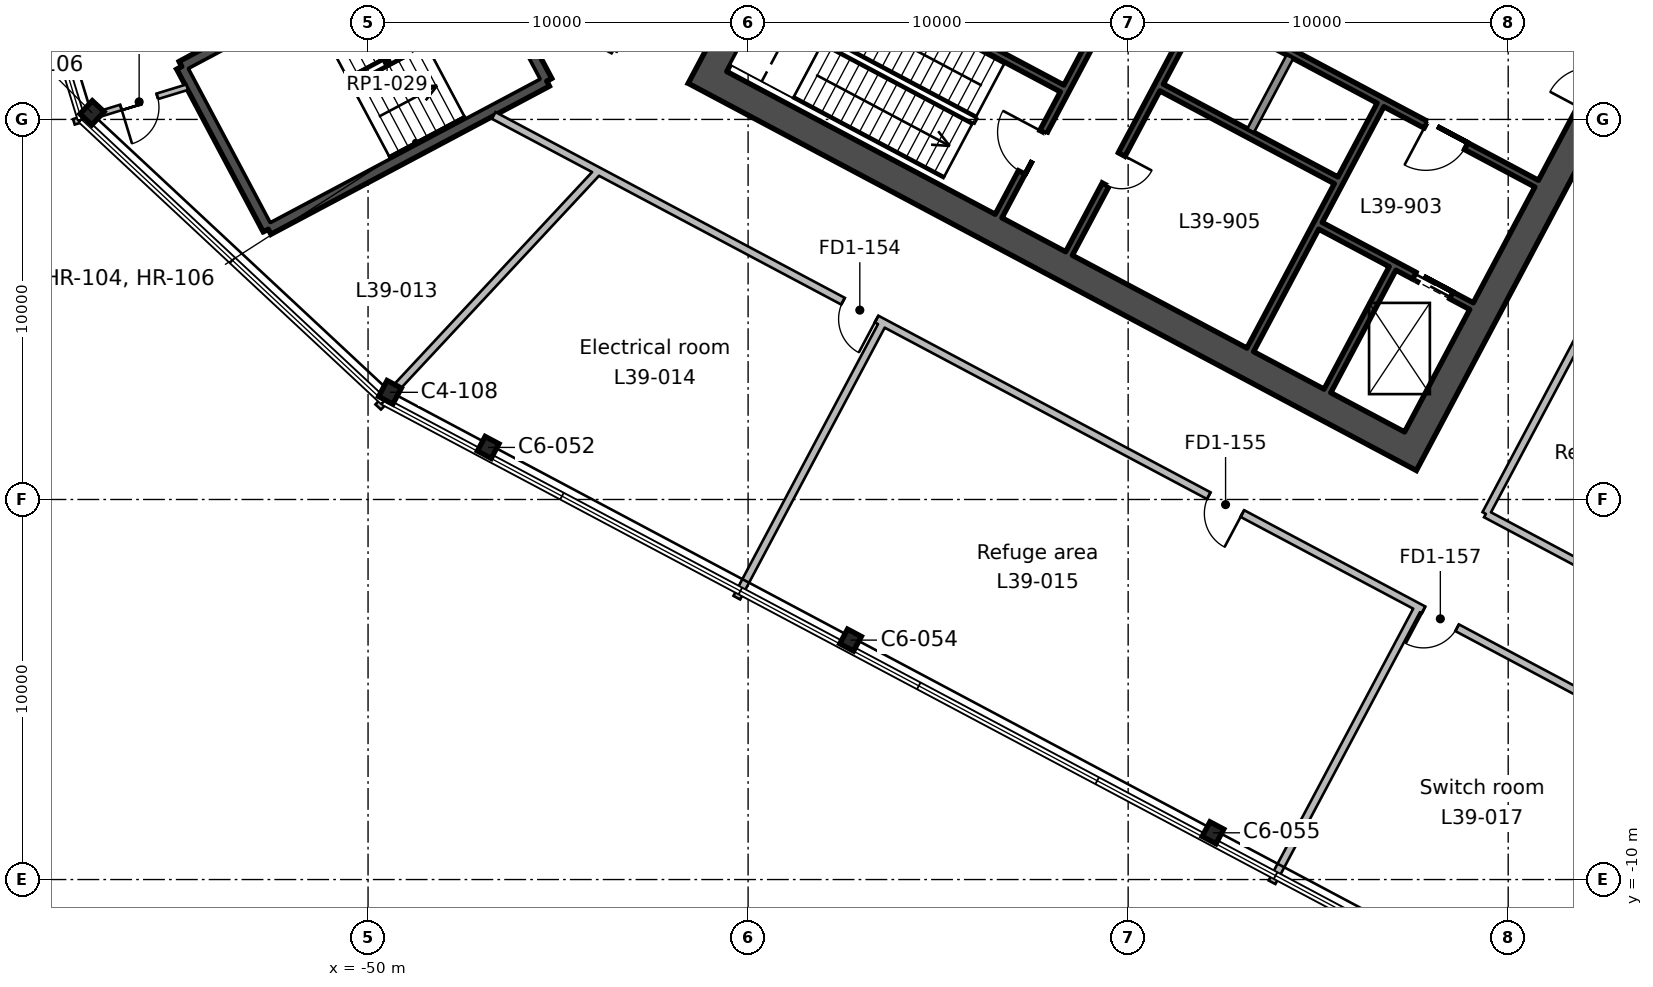
"""IFC4 building model, lengths in metres.
Left out: names, types, materials, properties, quantities, classifications, styles, units other than length and angle.
Written with IfcOpenShell. Run it as: python <this file> out.ifc"""

import sys

from ifc_helpers import new_model, si_unit, direction, frame, frame_2d, origin, origin_2d, place, context, subcontext, project, spatial, rectangle, i_section, extrude, element, fill, save


model = new_model("IFC4")
c1 = context("Model", 3, precision=1e-05, world=origin(), true_north=direction((0.0, 1.0)))
c2 = subcontext(c1, "Body", "Model", "MODEL_VIEW")
j1 = project(units=[si_unit("LENGTHUNIT", "METRE"), si_unit("PLANEANGLEUNIT", "RADIAN")], contexts=[c1])
p1 = place(None, origin())
s1 = spatial("IfcSite", under=j1, at=p1, CompositionType="ELEMENT")
p2 = place(p1, origin())
s2 = spatial("IfcBuilding", under=s1, at=p2, CompositionType="ELEMENT")
p3 = place(p2, frame((0.0, 0.0, 183.6)))
s3 = spatial("IfcBuildingStorey", under=s2, at=p3, CompositionType="ELEMENT", Elevation=183.6)
for number, where, z_axis, x_axis in (
    (1, (-27.768, -8.77, 0.0), (0.0, 0.0, 1.0), (0.883, -0.469, 0.0)),
    (2, (-37.304, -3.7, 0.0), (0.0, 0.0, 1.0), (0.883, -0.469, 0.0)),
    (3, (-46.839, 1.37, 0.0), (0.0, 0.0, 1.0), (0.883, -0.469, 0.0)),
):
    element("IfcColumn", number, at=place(p3, frame(where, z_axis=z_axis, x_axis=x_axis)), inside=s3, PredefinedType="COLUMN", context=c2, shape_type="SweptSolid", body=[
        extrude(i_section(OverallWidth=0.412, OverallDepth=0.434, WebThickness=0.036, FlangeThickness=0.057, FilletRadius=0.015, at=origin_2d()), origin(), (0.0, 0.0, 1.0), 6.0),
    ])
for number, where, z_axis, x_axis in (
    (4, (-49.423, 2.82, 0.0), (0.0, 0.0, 1.0), (0.883, -0.469, 0.0)),
    (5, (-57.262, 10.173, 0.0), (0.0, 0.0, 1.0), (0.731, -0.682, 0.0)),
):
    element("IfcColumn", number, at=place(p3, frame(where, z_axis=z_axis, x_axis=x_axis)), inside=s3, PredefinedType="COLUMN", context=c2, shape_type="SweptSolid", body=[
        extrude(i_section(OverallWidth=0.424, OverallDepth=0.475, WebThickness=0.048, FlangeThickness=0.077, FilletRadius=0.015, at=origin_2d()), origin(), (0.0, 0.0, 1.0), 6.0),
    ])
p4 = place(p3, frame((-13.498, 18.333, 0.0), z_axis=(0.0, 0.0, 1.0), x_axis=(-0.469469918705, -0.88294846703, 0.0)))
e6 = element("IfcWall", 6, at=p4, inside=s3, PredefinedType="SHEAR", context=c2, shape_type="SweptSolid", body=[
    extrude(rectangle(XDim=19.7, YDim=0.75, at=frame_2d((9.85, 0.0))), origin(), (0.0, 0.0, 1.0), 6.0),
])
p5 = place(p4, frame((6.85, 0.0, 0.0)))
e7 = element("IfcOpeningElement", 7, at=p5, cuts=e6, PredefinedType="OPENING", context=c2, shape_type="SweptSolid", body=[
    extrude(rectangle(XDim=2.4, YDim=2.4, at=frame_2d((1.2, 1.2))), frame((0.0, 0.385, 0.0), z_axis=(0.0, -1.0, 0.0), x_axis=(1.0, 0.0, 0.0)), (0.0, 0.0, 1.0), 0.77),
])
p6 = place(p3, frame((-31.996, 28.168, 0.0), z_axis=(0.0, 0.0, 1.0), x_axis=(-0.469479580143, -0.882943329908, 0.0)))
e8 = element("IfcWall", 8, at=p6, inside=s3, PredefinedType="SHEAR", context=c2, shape_type="SweptSolid", body=[
    extrude(rectangle(XDim=19.7, YDim=0.75, at=frame_2d((9.85, 0.0))), origin(), (0.0, 0.0, 1.0), 6.0),
])
p7 = place(p6, frame((10.45, 0.0, 0.0)))
e9 = element("IfcOpeningElement", 9, at=p7, cuts=e8, PredefinedType="OPENING", context=c2, shape_type="SweptSolid", body=[
    extrude(rectangle(XDim=2.4, YDim=2.4, at=frame_2d((1.2, 1.2))), frame((0.0, 0.385, 0.0), z_axis=(0.0, -1.0, 0.0), x_axis=(1.0, 0.0, 0.0)), (0.0, 0.0, 1.0), 0.77),
])
p8 = place(p3, frame((-22.902, 1.446, 0.0), z_axis=(0.0, 0.0, 1.0), x_axis=(-0.88294509198, 0.469476266226, 0.0)))
e10 = element("IfcWall", 10, at=p8, inside=s3, PredefinedType="SHEAR", context=c2, shape_type="SweptSolid", body=[
    extrude(rectangle(XDim=20.2, YDim=0.75, at=frame_2d((10.1, 0.0))), origin(), (0.0, 0.0, 1.0), 6.0),
])
p9 = place(p3, frame((-23.043, 6.08, 0.0), z_axis=(0.0, 0.0, 1.0), x_axis=(-0.469494272526, -0.882935517501, 0.0)))
e11 = element("IfcWall", 11, at=p9, inside=s3, PredefinedType="SHEAR", context=c2, shape_type="SweptSolid", body=[
    extrude(rectangle(XDim=3.65, YDim=0.2, at=frame_2d((1.825, 0.0))), origin(), (0.0, 0.0, 1.0), 6.0),
])
p10 = place(p3, frame((-23.36, 10.382, 0.0), z_axis=(0.0, 0.0, 1.0), x_axis=(-0.469480409012, -0.88294288918, 0.0)))
e12 = element("IfcWall", 12, at=p10, inside=s3, PredefinedType="SHEAR", context=c2, shape_type="SweptSolid", body=[
    extrude(rectangle(XDim=7.3, YDim=0.2, at=frame_2d((3.65, 0.0))), origin(), (0.0, 0.0, 1.0), 6.0),
])
p11 = place(p3, frame((-25.744, 11.65, 0.0), z_axis=(0.0, 0.0, 1.0), x_axis=(-0.469487830541, -0.882938942948, 0.0)))
e13 = element("IfcWall", 13, at=p11, inside=s3, PredefinedType="SOLIDWALL", context=c2, shape_type="SweptSolid", body=[
    extrude(rectangle(XDim=2.2, YDim=0.2, at=frame_2d((1.1, 0.0))), origin(), (0.0, 0.0, 1.0), 6.0),
])
p12 = place(p3, frame((-28.128, 12.917, 0.0), z_axis=(0.0, 0.0, 1.0), x_axis=(-0.469454336211, -0.882956752176, 0.0)))
e14 = element("IfcWall", 14, at=p12, inside=s3, PredefinedType="SHEAR", context=c2, shape_type="SweptSolid", body=[
    extrude(rectangle(XDim=7.3, YDim=0.2, at=frame_2d((3.65, 0.0))), origin(), (0.0, 0.0, 1.0), 6.0),
])
p13 = place(p12, frame((4.35, 0.0, 0.0)))
e15 = element("IfcOpeningElement", 15, at=p13, cuts=e14, PredefinedType="OPENING", context=c2, shape_type="SweptSolid", body=[
    extrude(rectangle(XDim=0.9, YDim=2.1, at=frame_2d((0.45, 1.05))), frame((0.0, 0.11, 0.0), z_axis=(0.0, -1.0, 0.0), x_axis=(1.0, 0.0, 0.0)), (0.0, 0.0, 1.0), 0.22),
])
p14 = place(p3, frame((-29.982, 13.903, 0.0), z_axis=(0.0, 0.0, 1.0), x_axis=(-0.469454336211, -0.882956752176, 0.0)))
e16 = element("IfcWall", 16, at=p14, inside=s3, PredefinedType="SHEAR", context=c2, shape_type="SweptSolid", body=[
    extrude(rectangle(XDim=7.3, YDim=0.2, at=frame_2d((3.65, 0.0))), origin(), (0.0, 0.0, 1.0), 6.0),
])
p15 = place(p14, frame((4.8, 0.0, 0.0)))
e17 = element("IfcOpeningElement", 17, at=p15, cuts=e16, PredefinedType="OPENING", context=c2, shape_type="SweptSolid", body=[
    extrude(rectangle(XDim=1.2, YDim=2.1, at=frame_2d((0.6, 1.05))), frame((0.0, 0.11, 0.0), z_axis=(0.0, -1.0, 0.0), x_axis=(1.0, 0.0, 0.0)), (0.0, 0.0, 1.0), 0.22),
])
p16 = place(p3, frame((-19.252, 8.311, 0.0), z_axis=(0.0, 0.0, 1.0), x_axis=(-0.882955722218, 0.469456273365, 0.0)))
e18 = element("IfcWall", 18, at=p16, inside=s3, PredefinedType="SHEAR", context=c2, shape_type="SweptSolid", body=[
    extrude(rectangle(XDim=10.0, YDim=0.2, at=frame_2d((5.0, 0.0))), origin(), (0.0, 0.0, 1.0), 6.0),
])
p17 = place(p16, frame((2.1, 0.0, 0.0)))
e19 = element("IfcOpeningElement", 19, at=p17, cuts=e18, PredefinedType="OPENING", context=c2, shape_type="SweptSolid", body=[
    extrude(rectangle(XDim=1.2, YDim=2.1, at=frame_2d((0.6, 1.05))), frame((0.0, 0.11, 0.0), z_axis=(0.0, -1.0, 0.0), x_axis=(1.0, 0.0, 0.0)), (0.0, 0.0, 1.0), 0.22),
])
p18 = place(p3, frame((-24.528, 8.398, 0.0), z_axis=(0.0, 0.0, 1.0), x_axis=(-0.882953967957, 0.469459572775, 0.0)))
e20 = element("IfcWall", 20, at=p18, inside=s3, PredefinedType="SHEAR", context=c2, shape_type="SweptSolid", body=[
    extrude(rectangle(XDim=5.2, YDim=0.2, at=frame_2d((2.6, 0.0))), origin(), (0.0, 0.0, 1.0), 6.0),
])
p19 = place(p3, frame((-20.965, 5.088, 0.0), z_axis=(0.0, 0.0, 1.0), x_axis=(-0.882925986334, 0.469512196493, 0.0)))
e21 = element("IfcWall", 21, at=p19, inside=s3, PredefinedType="SHEAR", context=c2, shape_type="SweptSolid", body=[
    extrude(rectangle(XDim=4.5, YDim=0.2, at=frame_2d((2.25, 0.0))), origin(), (0.0, 0.0, 1.0), 6.0),
])
p20 = place(p19, frame((0.6, 0.0, 0.0)))
e22 = element("IfcOpeningElement", 22, at=p20, cuts=e21, PredefinedType="OPENING", context=c2, shape_type="SweptSolid", body=[
    extrude(rectangle(XDim=1.1, YDim=2.1, at=frame_2d((0.55, 1.05))), frame((0.0, 0.11, 0.0), z_axis=(0.0, -1.0, 0.0), x_axis=(1.0, 0.0, 0.0)), (0.0, 0.0, 1.0), 0.22),
])
p21 = place(p3, frame((-31.737, 10.816, 0.0), z_axis=(0.0, 0.0, 1.0), x_axis=(-0.882940221191, 0.469485426614, 0.0)))
e23 = element("IfcWall", 23, at=p21, inside=s3, PredefinedType="SHEAR", context=c2, shape_type="SweptSolid", body=[
    extrude(rectangle(XDim=8.0, YDim=0.2, at=frame_2d((4.0, 0.0))), origin(), (0.0, 0.0, 1.0), 6.0),
])
p22 = place(p3, frame((-47.574, 15.29, 0.0), z_axis=(0.0, 0.0, 1.0), x_axis=(0.469443498566, -0.882962514297, 0.0)))
e24 = element("IfcWall", 24, at=p22, inside=s3, PredefinedType="SHEAR", context=c2, shape_type="SweptSolid", body=[
    extrude(rectangle(XDim=4.85, YDim=0.3, at=frame_2d((2.425, 0.0))), origin(), (0.0, 0.0, 1.0), 6.0),
])
p23 = place(p3, frame((-45.297, 11.007, 0.0), z_axis=(0.0, 0.0, 1.0), x_axis=(-0.882951519127, -0.469464178475, 0.0)))
e25 = element("IfcWall", 25, at=p23, inside=s3, PredefinedType="SHEAR", context=c2, shape_type="SweptSolid", body=[
    extrude(rectangle(XDim=8.3, YDim=0.3, at=frame_2d((4.15, 0.0))), origin(), (0.0, 0.0, 1.0), 6.0),
])
p24 = place(p3, frame((-52.626, 7.111, 0.0), z_axis=(0.0, 0.0, 1.0), x_axis=(-0.469464364128, 0.882951420416, 0.0)))
e26 = element("IfcWall", 26, at=p24, inside=s3, PredefinedType="SHEAR", context=c2, shape_type="SweptSolid", body=[
    extrude(rectangle(XDim=4.85, YDim=0.3, at=frame_2d((2.425, 0.0))), origin(), (0.0, 0.0, 1.0), 6.0),
])
p25 = place(p3, frame((-54.903, 11.393, 0.0), z_axis=(0.0, 0.0, 1.0), x_axis=(0.882939326045, 0.469487110071, 0.0)))
e27 = element("IfcWall", 27, at=p25, inside=s3, PredefinedType="SHEAR", context=c2, shape_type="SweptSolid", body=[
    extrude(rectangle(XDim=8.3, YDim=0.3, at=frame_2d((4.15, 0.0))), origin(), (0.0, 0.0, 1.0), 6.0),
])
p26 = place(p25, frame((6.05, 0.0, 0.0)))
e28 = element("IfcOpeningElement", 28, at=p26, cuts=e27, PredefinedType="OPENING", context=c2, shape_type="SweptSolid", body=[
    extrude(rectangle(XDim=1.9, YDim=2.1, at=frame_2d((0.95, 1.05))), frame((0.0, 0.16, 0.0), z_axis=(0.0, -1.0, 0.0), x_axis=(1.0, 0.0, 0.0)), (0.0, 0.0, 1.0), 0.32),
])
p27 = place(p3, frame((-54.761, 10.848, 0.0), z_axis=(0.0, 0.0, 1.0), x_axis=(-0.956301064033, -0.29238378021, 0.0)))
e29 = element("IfcWall", 29, at=p27, inside=s3, PredefinedType="PARTITIONING", context=c2, shape_type="SweptSolid", body=[
    extrude(rectangle(XDim=3.115, YDim=0.15, at=frame_2d((1.558, 0.0))), origin(), (0.0, 0.0, 1.0), 5.55),
])
p28 = place(p27, frame((0.82, 0.0, 0.0)))
e30 = element("IfcOpeningElement", 30, at=p28, cuts=e29, PredefinedType="OPENING", context=c2, shape_type="SweptSolid", body=[
    extrude(rectangle(XDim=1.0, YDim=2.1, at=frame_2d((0.5, 1.05))), frame((0.0, 0.085, 0.0), z_axis=(0.0, -1.0, 0.0), x_axis=(1.0, 0.0, 0.0)), (0.0, 0.0, 1.0), 0.17),
])
p29 = place(p3, frame((-43.943, 8.642, 0.0), z_axis=(0.0, 0.0, 1.0), x_axis=(-0.681987228604, -0.731364081714, 0.0)))
e31 = element("IfcWall", 31, at=p29, inside=s3, PredefinedType="PARTITIONING", context=c2, shape_type="SweptSolid", body=[
    extrude(rectangle(XDim=8.49, YDim=0.2, at=frame_2d((4.245, 0.0))), origin(), (0.0, 0.0, 1.0), 5.55),
])
p30 = place(p3, frame((-36.447, 4.656, 0.0), z_axis=(0.0, 0.0, 1.0), x_axis=(-0.4695216236, -0.882920973231, 0.0)))
e32 = element("IfcWall", 32, at=p30, inside=s3, PredefinedType="PARTITIONING", context=c2, shape_type="SweptSolid", body=[
    extrude(rectangle(XDim=8.2, YDim=0.2, at=frame_2d((4.1, 0.0))), origin(), (0.0, 0.0, 1.0), 5.55),
])
p31 = place(p3, frame((-43.544, 11.827, 0.0), z_axis=(0.0, 0.0, 1.0), x_axis=(-0.88289413979, 0.469572079584, 0.0)))
e33 = element("IfcWall", 33, at=p31, inside=s3, PredefinedType="PARTITIONING", context=c2, shape_type="SweptSolid", body=[
    extrude(rectangle(XDim=3.168, YDim=0.2, at=frame_2d((1.584, 0.0))), origin(), (0.0, 0.0, 1.0), 5.55),
])
p32 = place(p3, frame((-8.144, -10.393, 0.0), z_axis=(0.0, 0.0, 1.0), x_axis=(-0.882945087791, 0.469476274102, 0.0)))
e34 = element("IfcWall", 34, at=p32, inside=s3, PredefinedType="PARTITIONING", context=c2, shape_type="SweptSolid", body=[
    extrude(rectangle(XDim=43.66, YDim=0.2, at=frame_2d((21.83, 0.0))), origin(), (0.0, 0.0, 1.0), 5.55),
])
p33 = place(p32, frame((32.25, 0.0, 0.0)))
e35 = element("IfcOpeningElement", 35, at=p33, cuts=e34, PredefinedType="OPENING", context=c2, shape_type="SweptSolid", body=[
    extrude(rectangle(XDim=1.0, YDim=2.1, at=frame_2d((0.5, 1.05))), frame((0.0, 0.11, 0.0), z_axis=(0.0, -1.0, 0.0), x_axis=(1.0, 0.0, 0.0)), (0.0, 0.0, 1.0), 0.22),
])
p34 = place(p32, frame((21.35, 0.0, 0.0)))
e36 = element("IfcOpeningElement", 36, at=p34, cuts=e34, PredefinedType="OPENING", context=c2, shape_type="SweptSolid", body=[
    extrude(rectangle(XDim=1.0, YDim=2.1, at=frame_2d((0.5, 1.05))), frame((0.0, 0.11, 0.0), z_axis=(0.0, -1.0, 0.0), x_axis=(1.0, 0.0, 0.0)), (0.0, 0.0, 1.0), 0.22),
])
p35 = place(p32, frame((14.95, 0.0, 0.0)))
e37 = element("IfcOpeningElement", 37, at=p35, cuts=e34, PredefinedType="OPENING", context=c2, shape_type="SweptSolid", body=[
    extrude(rectangle(XDim=1.0, YDim=2.1, at=frame_2d((0.5, 1.05))), frame((0.0, 0.11, 0.0), z_axis=(0.0, -1.0, 0.0), x_axis=(1.0, 0.0, 0.0)), (0.0, 0.0, 1.0), 0.22),
])
p36 = place(p32, frame((4.35, 0.0, 0.0)))
e38 = element("IfcOpeningElement", 38, at=p36, cuts=e34, PredefinedType="OPENING", context=c2, shape_type="SweptSolid", body=[
    extrude(rectangle(XDim=1.0, YDim=2.1, at=frame_2d((0.5, 1.05))), frame((0.0, 0.11, 0.0), z_axis=(0.0, -1.0, 0.0), x_axis=(1.0, 0.0, 0.0)), (0.0, 0.0, 1.0), 0.22),
])
p37 = place(p3, frame((-22.364, -2.832, 0.0), z_axis=(0.0, 0.0, 1.0), x_axis=(-0.4695216236, -0.882920973231, 0.0)))
e39 = element("IfcWall", 39, at=p37, inside=s3, PredefinedType="PARTITIONING", context=c2, shape_type="SweptSolid", body=[
    extrude(rectangle(XDim=8.2, YDim=0.2, at=frame_2d((4.1, 0.0))), origin(), (0.0, 0.0, 1.0), 5.55),
])
p38 = place(p3, frame((-20.588, -0.379, 0.0), z_axis=(0.0, 0.0, 1.0), x_axis=(0.469489882812, 0.882937851685, 0.0)))
e40 = element("IfcWall", 40, at=p38, inside=s3, PredefinedType="PARTITIONING", context=c2, shape_type="SweptSolid", body=[
    extrude(rectangle(XDim=20.0, YDim=0.2, at=frame_2d((10.0, 0.0))), origin(), (0.0, 0.0, 1.0), 5.55),
])
p39 = place(p38, frame((9.55, 0.0, 0.0)))
e41 = element("IfcOpeningElement", 41, at=p39, cuts=e40, PredefinedType="OPENING", context=c2, shape_type="SweptSolid", body=[
    extrude(rectangle(XDim=1.0, YDim=2.1, at=frame_2d((0.5, 1.05))), frame((0.0, 0.11, 0.0), z_axis=(0.0, -1.0, 0.0), x_axis=(1.0, 0.0, 0.0)), (0.0, 0.0, 1.0), 0.22),
])
p40 = place(p3, frame((-20.588, -0.379, 0.0), z_axis=(0.0, 0.0, 1.0), x_axis=(0.882951465933, -0.469464278521, 0.0)))
e42 = element("IfcWall", 42, at=p40, inside=s3, PredefinedType="PARTITIONING", context=c2, shape_type="SweptSolid", body=[
    extrude(rectangle(XDim=18.0, YDim=0.2, at=frame_2d((9.0, 0.0))), origin(), (0.0, 0.0, 1.0), 5.55),
])
p41 = place(p40, frame((8.45, 0.0, 0.0)))
e43 = element("IfcOpeningElement", 43, at=p41, cuts=e42, PredefinedType="OPENING", context=c2, shape_type="SweptSolid", body=[
    extrude(rectangle(XDim=1.0, YDim=2.1, at=frame_2d((0.5, 1.05))), frame((0.0, 0.11, 0.0), z_axis=(0.0, -1.0, 0.0), x_axis=(1.0, 0.0, 0.0)), (0.0, 0.0, 1.0), 0.22),
])
p42 = place(p17, origin())
e44 = element("IfcDoor", 44, at=p42, inside=s3, OperationType="SINGLE_SWING_RIGHT", PredefinedType="DOOR", context=c2, shape_type="SweptSolid", body=[
    extrude(rectangle(XDim=1.2, YDim=2.1, at=frame_2d((0.6, 1.05))), frame((0.0, 0.025, 0.0), z_axis=(0.0, -1.0, 0.0), x_axis=(1.0, 0.0, 0.0)), (0.0, 0.0, 1.0), 0.05),
])
fill(e19, e44)
p43 = place(p15, frame((1.2, 0.0, 0.0), z_axis=(0.0, 0.0, 1.0), x_axis=(-1.0, 0.0, 0.0)))
e45 = element("IfcDoor", 45, at=p43, inside=s3, OperationType="SINGLE_SWING_RIGHT", PredefinedType="DOOR", context=c2, shape_type="SweptSolid", body=[
    extrude(rectangle(XDim=1.2, YDim=2.1, at=frame_2d((0.6, 1.05))), frame((0.0, 0.025, 0.0), z_axis=(0.0, -1.0, 0.0), x_axis=(1.0, 0.0, 0.0)), (0.0, 0.0, 1.0), 0.05),
])
fill(e17, e45)
p44 = place(p20, origin())
e46 = element("IfcDoor", 46, at=p44, inside=s3, OperationType="DOUBLE_DOOR_SLIDING", PredefinedType="DOOR", context=c2, shape_type="SweptSolid", body=[
    extrude(rectangle(XDim=1.1, YDim=2.1, at=frame_2d((0.55, 1.05))), frame((0.0, 0.025, 0.0), z_axis=(0.0, -1.0, 0.0), x_axis=(1.0, 0.0, 0.0)), (0.0, 0.0, 1.0), 0.05),
])
fill(e22, e46)
p45 = place(p13, origin())
e47 = element("IfcDoor", 47, at=p45, inside=s3, OperationType="SINGLE_SWING_LEFT", PredefinedType="DOOR", context=c2, shape_type="SweptSolid", body=[
    extrude(rectangle(XDim=0.9, YDim=2.1, at=frame_2d((0.45, 1.05))), frame((0.0, 0.025, 0.0), z_axis=(0.0, -1.0, 0.0), x_axis=(1.0, 0.0, 0.0)), (0.0, 0.0, 1.0), 0.05),
])
fill(e15, e47)
p46 = place(p28, origin())
e48 = element("IfcDoor", 48, at=p46, inside=s3, OperationType="SINGLE_SWING_RIGHT", PredefinedType="DOOR", context=c2, shape_type="SweptSolid", body=[
    extrude(rectangle(XDim=1.0, YDim=2.1, at=frame_2d((0.5, 1.05))), frame((0.0, 0.025, 0.0), z_axis=(0.0, -1.0, 0.0), x_axis=(1.0, 0.0, 0.0)), (0.0, 0.0, 1.0), 0.05),
])
fill(e30, e48)
p47 = place(p33, origin())
e49 = element("IfcDoor", 49, at=p47, inside=s3, OperationType="SINGLE_SWING_LEFT", PredefinedType="DOOR", context=c2, shape_type="SweptSolid", body=[
    extrude(rectangle(XDim=1.0, YDim=2.1, at=frame_2d((0.5, 1.05))), frame((0.0, 0.025, 0.0), z_axis=(0.0, -1.0, 0.0), x_axis=(1.0, 0.0, 0.0)), (0.0, 0.0, 1.0), 0.05),
])
fill(e35, e49)
p48 = place(p34, origin())
e50 = element("IfcDoor", 50, at=p48, inside=s3, OperationType="SINGLE_SWING_LEFT", PredefinedType="DOOR", context=c2, shape_type="SweptSolid", body=[
    extrude(rectangle(XDim=1.0, YDim=2.1, at=frame_2d((0.5, 1.05))), frame((0.0, 0.025, 0.0), z_axis=(0.0, -1.0, 0.0), x_axis=(1.0, 0.0, 0.0)), (0.0, 0.0, 1.0), 0.05),
])
fill(e36, e50)
p49 = place(p35, origin())
e51 = element("IfcDoor", 51, at=p49, inside=s3, OperationType="SINGLE_SWING_RIGHT", PredefinedType="DOOR", context=c2, shape_type="SweptSolid", body=[
    extrude(rectangle(XDim=1.0, YDim=2.1, at=frame_2d((0.5, 1.05))), frame((0.0, 0.025, 0.0), z_axis=(0.0, -1.0, 0.0), x_axis=(1.0, 0.0, 0.0)), (0.0, 0.0, 1.0), 0.05),
])
fill(e37, e51)
save(model, sys.argv[1])
